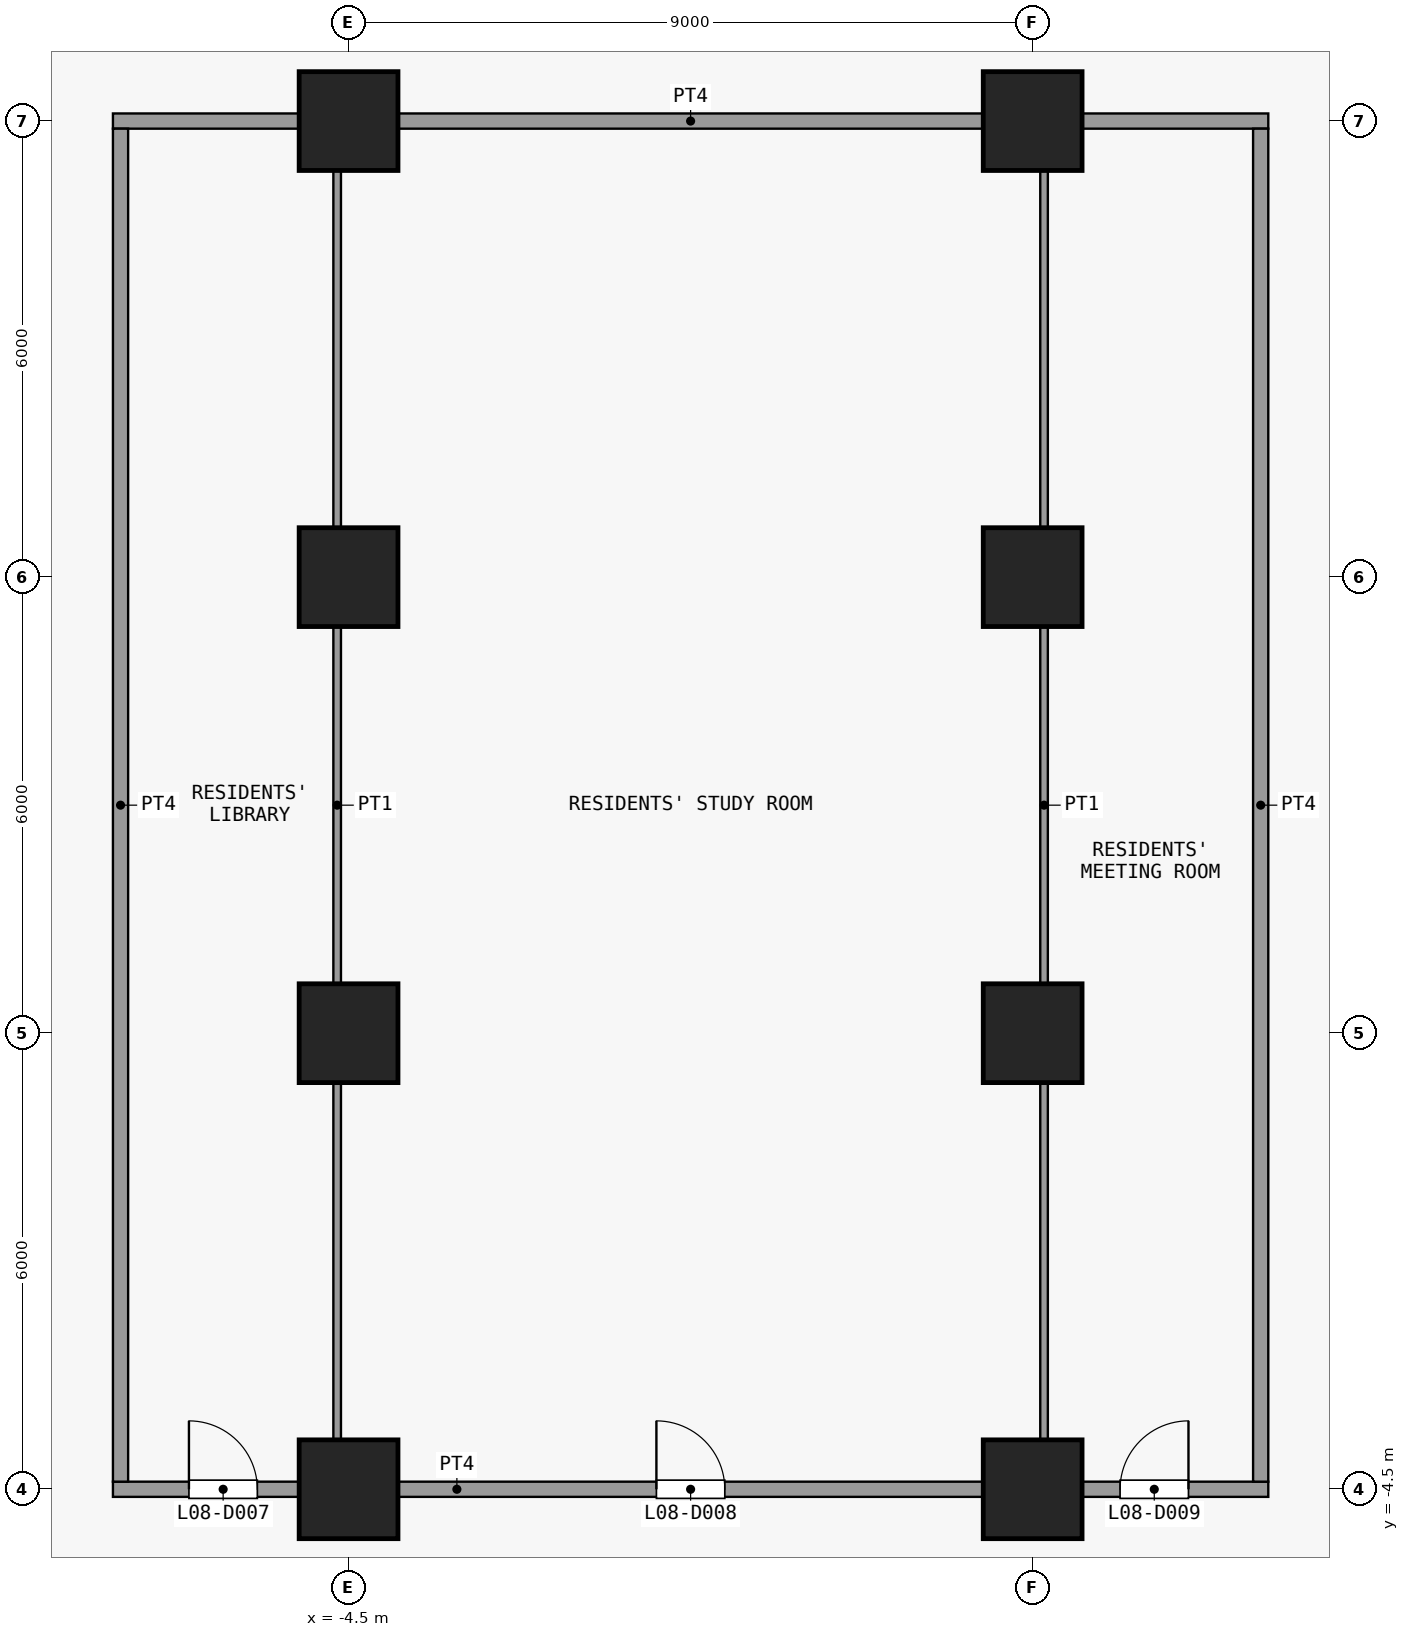
"""IFC4 building model, lengths in metres.
Left out: names, types, materials, properties, quantities, classifications, styles, units other than length and angle.
Written with IfcOpenShell. Run it as: python <this file> out.ifc"""

import sys

from ifc_helpers import new_model, si_unit, direction, frame, frame_2d, origin, origin_2d, place, context, subcontext, project, spatial, rectangle, extrude, element, fill, save


model = new_model("IFC4")
c1 = context("Model", 3, precision=1e-05, world=origin(), true_north=direction((0.0, 1.0)))
c2 = subcontext(c1, "Body", "Model", "MODEL_VIEW")
j1 = project(units=[si_unit("LENGTHUNIT", "METRE"), si_unit("PLANEANGLEUNIT", "RADIAN")], contexts=[c1])
p1 = place(None, origin())
s1 = spatial("IfcSite", under=j1, at=p1, CompositionType="ELEMENT")
p2 = place(p1, origin())
s2 = spatial("IfcBuilding", under=s1, at=p2, CompositionType="ELEMENT")
p3 = place(p2, frame((0.0, 0.0, 39.7)))
s3 = spatial("IfcBuildingStorey", under=s2, at=p3, CompositionType="ELEMENT", Elevation=39.7)
for number, where, z_axis, x_axis in (
    (1, (-4.5, -4.5, 0.0), (0.0, 0.0, 1.0), (1.0, 0.0, 0.0)),
    (2, (-4.5, 1.5, 0.0), (0.0, 0.0, 1.0), (1.0, 0.0, 0.0)),
    (3, (-4.5, 7.5, 0.0), (0.0, 0.0, 1.0), (1.0, 0.0, 0.0)),
    (4, (-4.5, 13.5, 0.0), (0.0, 0.0, 1.0), (1.0, 0.0, 0.0)),
    (5, (4.5, -4.5, 0.0), (0.0, 0.0, 1.0), (1.0, 0.0, 0.0)),
    (6, (4.5, 1.5, 0.0), (0.0, 0.0, 1.0), (1.0, 0.0, 0.0)),
    (7, (4.5, 7.5, 0.0), (0.0, 0.0, 1.0), (1.0, 0.0, 0.0)),
    (8, (4.5, 13.5, 0.0), (0.0, 0.0, 1.0), (1.0, 0.0, 0.0)),
):
    element("IfcColumn", number, at=place(p3, frame(where, z_axis=z_axis, x_axis=x_axis)), inside=s3, PredefinedType="COLUMN", context=c2, shape_type="SweptSolid", body=[
        extrude(rectangle(XDim=1.3, YDim=1.3, at=origin_2d()), origin(), (0.0, 0.0, 1.0), 3.6),
    ])
p4 = place(p3, frame((-7.6, -4.5, 0.0), z_axis=(0.0, 0.0, 1.0), x_axis=(1.0, 0.0, 0.0)))
e9 = element("IfcWall", 9, at=p4, inside=s3, PredefinedType="PARTITIONING", context=c2, shape_type="SweptSolid", body=[
    extrude(rectangle(XDim=15.2, YDim=0.2, at=frame_2d((7.6, 0.0))), origin(), (0.0, 0.0, 1.0), 3.3),
])
p5 = place(p4, frame((1.0, 0.0, 0.0)))
e10 = element("IfcOpeningElement", 10, at=p5, cuts=e9, PredefinedType="OPENING", context=c2, shape_type="SweptSolid", body=[
    extrude(rectangle(XDim=0.9, YDim=2.1, at=frame_2d((0.45, 1.05))), frame((0.0, 0.11, 0.0), z_axis=(0.0, -1.0, 0.0), x_axis=(1.0, 0.0, 0.0)), (0.0, 0.0, 1.0), 0.22),
])
p6 = place(p4, frame((7.15, 0.0, 0.0)))
e11 = element("IfcOpeningElement", 11, at=p6, cuts=e9, PredefinedType="OPENING", context=c2, shape_type="SweptSolid", body=[
    extrude(rectangle(XDim=0.9, YDim=2.1, at=frame_2d((0.45, 1.05))), frame((0.0, 0.11, 0.0), z_axis=(0.0, -1.0, 0.0), x_axis=(1.0, 0.0, 0.0)), (0.0, 0.0, 1.0), 0.22),
])
p7 = place(p4, frame((13.25, 0.0, 0.0)))
e12 = element("IfcOpeningElement", 12, at=p7, cuts=e9, PredefinedType="OPENING", context=c2, shape_type="SweptSolid", body=[
    extrude(rectangle(XDim=0.9, YDim=2.1, at=frame_2d((0.45, 1.05))), frame((0.0, 0.11, 0.0), z_axis=(0.0, -1.0, 0.0), x_axis=(1.0, 0.0, 0.0)), (0.0, 0.0, 1.0), 0.22),
])
p8 = place(p3, frame((-7.6, 13.5, 0.0), z_axis=(0.0, 0.0, 1.0), x_axis=(1.0, 0.0, 0.0)))
e13 = element("IfcWall", 13, at=p8, inside=s3, PredefinedType="PARTITIONING", context=c2, shape_type="SweptSolid", body=[
    extrude(rectangle(XDim=15.2, YDim=0.2, at=frame_2d((7.6, 0.0))), origin(), (0.0, 0.0, 1.0), 3.3),
])
p9 = place(p3, frame((-7.5, -4.4, 0.0), z_axis=(0.0, 0.0, 1.0), x_axis=(0.0, 1.0, 0.0)))
e14 = element("IfcWall", 14, at=p9, inside=s3, PredefinedType="PARTITIONING", context=c2, shape_type="SweptSolid", body=[
    extrude(rectangle(XDim=17.8, YDim=0.2, at=frame_2d((8.9, 0.0))), origin(), (0.0, 0.0, 1.0), 3.3),
])
for number, where, z_axis, x_axis in (
    (15, (-4.65, -4.4, 0.0), (0.0, 0.0, 1.0), (0.0, 1.0, 0.0)),
    (16, (4.65, -4.4, 0.0), (0.0, 0.0, 1.0), (0.0, 1.0, 0.0)),
):
    element("IfcWall", number, at=place(p3, frame(where, z_axis=z_axis, x_axis=x_axis)), inside=s3, PredefinedType="PARTITIONING", context=c2, shape_type="SweptSolid", body=[
        extrude(rectangle(XDim=17.8, YDim=0.1, at=frame_2d((8.9, 0.0))), origin(), (0.0, 0.0, 1.0), 3.3),
    ])
p10 = place(p3, frame((7.5, -4.4, 0.0), z_axis=(0.0, 0.0, 1.0), x_axis=(0.0, 1.0, 0.0)))
e17 = element("IfcWall", 17, at=p10, inside=s3, PredefinedType="PARTITIONING", context=c2, shape_type="SweptSolid", body=[
    extrude(rectangle(XDim=17.8, YDim=0.2, at=frame_2d((8.9, 0.0))), origin(), (0.0, 0.0, 1.0), 3.3),
])
p11 = place(p5, origin())
e18 = element("IfcDoor", 18, at=p11, inside=s3, OperationType="SINGLE_SWING_RIGHT", PredefinedType="DOOR", context=c2, shape_type="SweptSolid", body=[
    extrude(rectangle(XDim=0.9, YDim=2.1, at=frame_2d((0.45, 1.05))), frame((0.0, 0.025, 0.0), z_axis=(0.0, -1.0, 0.0), x_axis=(1.0, 0.0, 0.0)), (0.0, 0.0, 1.0), 0.05),
])
fill(e10, e18)
p12 = place(p6, origin())
e19 = element("IfcDoor", 19, at=p12, inside=s3, OperationType="SINGLE_SWING_RIGHT", PredefinedType="DOOR", context=c2, shape_type="SweptSolid", body=[
    extrude(rectangle(XDim=0.9, YDim=2.1, at=frame_2d((0.45, 1.05))), frame((0.0, 0.025, 0.0), z_axis=(0.0, -1.0, 0.0), x_axis=(1.0, 0.0, 0.0)), (0.0, 0.0, 1.0), 0.05),
])
fill(e11, e19)
p13 = place(p7, origin())
e20 = element("IfcDoor", 20, at=p13, inside=s3, OperationType="SINGLE_SWING_LEFT", PredefinedType="DOOR", context=c2, shape_type="SweptSolid", body=[
    extrude(rectangle(XDim=0.9, YDim=2.1, at=frame_2d((0.45, 1.05))), frame((0.0, 0.025, 0.0), z_axis=(0.0, -1.0, 0.0), x_axis=(1.0, 0.0, 0.0)), (0.0, 0.0, 1.0), 0.05),
])
fill(e12, e20)
save(model, sys.argv[1])
